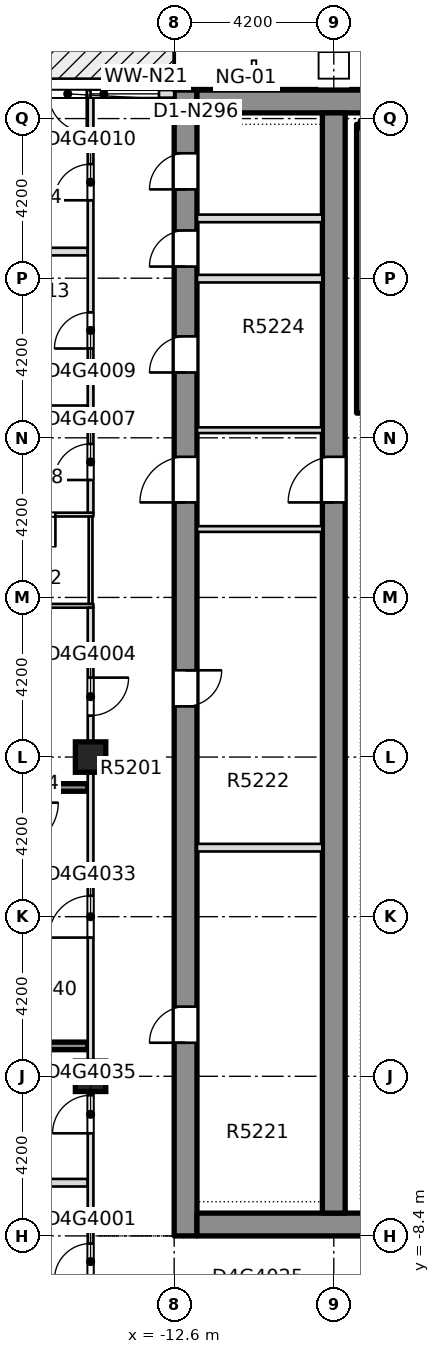
"""IFC4 building model, lengths in metres.
Left out: names, types, materials, properties, quantities, classifications, styles, units other than length and angle.
Written with IfcOpenShell. Run it as: python <this file> out.ifc"""

import sys

from ifc_helpers import new_model, si_unit, direction, frame, frame_2d, origin, origin_2d, place, context, subcontext, project, spatial, rectangle, extrude, element, fill, save


model = new_model("IFC4")
c1 = context("Model", 3, precision=1e-05, world=origin(), true_north=direction((0.0, 1.0)))
c2 = subcontext(c1, "Body", "Model", "MODEL_VIEW")
j1 = project(units=[si_unit("LENGTHUNIT", "METRE"), si_unit("PLANEANGLEUNIT", "RADIAN")], contexts=[c1])
p1 = place(None, origin())
s1 = spatial("IfcSite", under=j1, at=p1, CompositionType="ELEMENT")
p2 = place(p1, origin())
s2 = spatial("IfcBuilding", under=s1, at=p2, CompositionType="ELEMENT")
p3 = place(p2, frame((0.0, 0.0, 199.7)))
s3 = spatial("IfcBuildingStorey", under=s2, at=p3, CompositionType="ELEMENT", Elevation=199.7)
p4 = place(p3, frame((-12.3, -8.4, -0.4), z_axis=(0.0, 0.0, 1.0), x_axis=(0.0, 1.0, 0.0)))
e1 = element("IfcWall", 1, at=p4, inside=s3, PredefinedType="SHEAR", context=c2, shape_type="SweptSolid", body=[
    extrude(rectangle(XDim=30.15, YDim=0.6, at=frame_2d((15.075, 0.0))), origin(), (0.0, 0.0, 1.0), 3.45),
])
p5 = place(p4, frame((5.083, 0.0, 0.4)))
e2 = element("IfcOpeningElement", 2, at=p5, cuts=e1, PredefinedType="OPENING", context=c2, shape_type="SweptSolid", body=[
    extrude(rectangle(XDim=0.95, YDim=2.1, at=frame_2d((0.475, 1.05))), frame((0.0, 0.31, 0.0), z_axis=(0.0, -1.0, 0.0), x_axis=(1.0, 0.0, 0.0)), (0.0, 0.0, 1.0), 0.62),
])
p6 = place(p4, frame((13.933, 0.0, 0.4)))
e3 = element("IfcOpeningElement", 3, at=p6, cuts=e1, PredefinedType="OPENING", context=c2, shape_type="SweptSolid", body=[
    extrude(rectangle(XDim=0.95, YDim=2.1, at=frame_2d((0.475, 1.05))), frame((0.0, 0.31, 0.0), z_axis=(0.0, -1.0, 0.0), x_axis=(1.0, 0.0, 0.0)), (0.0, 0.0, 1.0), 0.62),
])
p7 = place(p4, frame((22.719, 0.0, 0.4)))
e4 = element("IfcOpeningElement", 4, at=p7, cuts=e1, PredefinedType="OPENING", context=c2, shape_type="SweptSolid", body=[
    extrude(rectangle(XDim=0.95, YDim=2.1, at=frame_2d((0.475, 1.05))), frame((0.0, 0.31, 0.0), z_axis=(0.0, -1.0, 0.0), x_axis=(1.0, 0.0, 0.0)), (0.0, 0.0, 1.0), 0.62),
])
p8 = place(p4, frame((25.506, 0.0, 0.4)))
e5 = element("IfcOpeningElement", 5, at=p8, cuts=e1, PredefinedType="OPENING", context=c2, shape_type="SweptSolid", body=[
    extrude(rectangle(XDim=0.95, YDim=2.1, at=frame_2d((0.475, 1.05))), frame((0.0, 0.31, 0.0), z_axis=(0.0, -1.0, 0.0), x_axis=(1.0, 0.0, 0.0)), (0.0, 0.0, 1.0), 0.62),
])
p9 = place(p4, frame((27.537, 0.0, 0.4)))
e6 = element("IfcOpeningElement", 6, at=p9, cuts=e1, PredefinedType="OPENING", context=c2, shape_type="SweptSolid", body=[
    extrude(rectangle(XDim=0.95, YDim=2.1, at=frame_2d((0.475, 1.05))), frame((0.0, 0.31, 0.0), z_axis=(0.0, -1.0, 0.0), x_axis=(1.0, 0.0, 0.0)), (0.0, 0.0, 1.0), 0.62),
])
p10 = place(p4, frame((19.3, 0.0, 0.4)))
e7 = element("IfcOpeningElement", 7, at=p10, cuts=e1, PredefinedType="OPENING", context=c2, shape_type="SweptSolid", body=[
    extrude(rectangle(XDim=1.2, YDim=2.1, at=frame_2d((0.6, 1.05))), frame((0.0, 0.31, 0.0), z_axis=(0.0, -1.0, 0.0), x_axis=(1.0, 0.0, 0.0)), (0.0, 0.0, 1.0), 0.62),
])
p11 = place(p3, frame((-12.0, -8.1, -0.4), z_axis=(0.0, 0.0, 1.0), x_axis=(1.0, 0.0, 0.0)))
e8 = element("IfcWall", 8, at=p11, inside=s3, PredefinedType="SHEAR", context=c2, shape_type="SweptSolid", body=[
    extrude(rectangle(XDim=24.0, YDim=0.6, at=frame_2d((12.0, 0.0))), origin(), (0.0, 0.0, 1.0), 3.45),
])
p12 = place(p11, frame((7.25, 0.0, 0.4)))
e9 = element("IfcOpeningElement", 9, at=p12, cuts=e8, PredefinedType="OPENING", context=c2, shape_type="SweptSolid", body=[
    extrude(rectangle(XDim=1.8, YDim=2.1, at=frame_2d((0.9, 1.05))), frame((0.0, 0.31, 0.0), z_axis=(0.0, -1.0, 0.0), x_axis=(1.0, 0.0, 0.0)), (0.0, 0.0, 1.0), 0.62),
])
p13 = place(p11, frame((14.95, 0.0, 0.4)))
e10 = element("IfcOpeningElement", 10, at=p13, cuts=e8, PredefinedType="OPENING", context=c2, shape_type="SweptSolid", body=[
    extrude(rectangle(XDim=1.8, YDim=2.1, at=frame_2d((0.9, 1.05))), frame((0.0, 0.31, 0.0), z_axis=(0.0, -1.0, 0.0), x_axis=(1.0, 0.0, 0.0)), (0.0, 0.0, 1.0), 0.62),
])
p14 = place(p3, frame((-12.0, 21.45, -0.4), z_axis=(0.0, 0.0, 1.0), x_axis=(1.0, 0.0, 0.0)))
e11 = element("IfcWall", 11, at=p14, inside=s3, PredefinedType="SHEAR", context=c2, shape_type="SweptSolid", body=[
    extrude(rectangle(XDim=24.0, YDim=0.6, at=frame_2d((12.0, 0.0))), origin(), (0.0, 0.0, 1.0), 3.45),
])
p15 = place(p3, frame((-8.4, -7.8, -0.4), z_axis=(0.0, 0.0, 1.0), x_axis=(0.0, 1.0, 0.0)))
e12 = element("IfcWall", 12, at=p15, inside=s3, PredefinedType="SHEAR", context=c2, shape_type="SweptSolid", body=[
    extrude(rectangle(XDim=28.95, YDim=0.6, at=frame_2d((14.475, 0.0))), origin(), (0.0, 0.0, 1.0), 3.45),
])
p16 = place(p15, frame((18.7, 0.0, 0.4)))
e13 = element("IfcOpeningElement", 13, at=p16, cuts=e12, PredefinedType="OPENING", context=c2, shape_type="SweptSolid", body=[
    extrude(rectangle(XDim=1.2, YDim=2.1, at=frame_2d((0.6, 1.05))), frame((0.0, 0.31, 0.0), z_axis=(0.0, -1.0, 0.0), x_axis=(1.0, 0.0, 0.0)), (0.0, 0.0, 1.0), 0.62),
])
for number, where, z_axis, x_axis in (
    (14, (-14.8, -4.2, -0.4), (0.0, 0.0, 1.0), (1.0, 0.0, 0.0)),
    (15, (-14.8, 4.2, -0.4), (0.0, 0.0, 1.0), (1.0, 0.0, 0.0)),
):
    element("IfcColumn", number, at=place(p3, frame(where, z_axis=z_axis, x_axis=x_axis)), inside=s3, PredefinedType="COLUMN", context=c2, shape_type="SweptSolid", body=[
        extrude(rectangle(XDim=0.8, YDim=0.8, at=origin_2d()), origin(), (0.0, 0.0, 1.0), 3.45),
    ])
p17 = place(p3, frame((-25.75, -7.0, 0.0), z_axis=(0.0, 0.0, 1.0), x_axis=(1.0, 0.0, 0.0)))
e16 = element("IfcWall", 16, at=p17, inside=s3, PredefinedType="PARTITIONING", context=c2, shape_type="SweptSolid", body=[
    extrude(rectangle(XDim=10.875, YDim=0.2, at=frame_2d((5.438, 0.0))), origin(), (0.0, 0.0, 1.0), 3.05),
])
p18 = place(p3, frame((-20.4, -3.4, 0.0), z_axis=(0.0, 0.0, 1.0), x_axis=(1.0, 0.0, 0.0)))
e17 = element("IfcWall", 17, at=p18, inside=s3, PredefinedType="SOLIDWALL", context=c2, shape_type="SweptSolid", body=[
    extrude(rectangle(XDim=5.525, YDim=0.2, at=frame_2d((2.762, 0.0))), origin(), (0.0, 0.0, 1.0), 3.05),
])
p19 = place(p3, frame((-20.45, 3.4, 0.0), z_axis=(0.0, 0.0, 1.0), x_axis=(1.0, 0.0, 0.0)))
e18 = element("IfcWall", 18, at=p19, inside=s3, PredefinedType="SOLIDWALL", context=c2, shape_type="SweptSolid", body=[
    extrude(rectangle(XDim=5.575, YDim=0.2, at=frame_2d((2.788, 0.0))), origin(), (0.0, 0.0, 1.0), 3.05),
])
p20 = place(p3, frame((-17.55, 8.18, 0.0), z_axis=(0.0, 0.0, 1.0), x_axis=(1.0, 0.0, 0.0)))
e19 = element("IfcWall", 19, at=p20, inside=s3, PredefinedType="PARTITIONING", context=c2, shape_type="SweptSolid", body=[
    extrude(rectangle(XDim=2.825, YDim=0.1, at=frame_2d((1.413, 0.0))), origin(), (0.0, 0.0, 1.0), 3.05),
])
p21 = place(p3, frame((-17.55, 10.58, 0.0), z_axis=(0.0, 0.0, 1.0), x_axis=(1.0, 0.0, 0.0)))
e20 = element("IfcWall", 20, at=p21, inside=s3, PredefinedType="PARTITIONING", context=c2, shape_type="SweptSolid", body=[
    extrude(rectangle(XDim=2.825, YDim=0.1, at=frame_2d((1.413, 0.0))), origin(), (0.0, 0.0, 1.0), 3.05),
])
p22 = place(p21, frame((0.975, 0.0, 0.0)))
e21 = element("IfcOpeningElement", 21, at=p22, cuts=e20, PredefinedType="OPENING", context=c2, shape_type="SweptSolid", body=[
    extrude(rectangle(XDim=0.85, YDim=2.1, at=frame_2d((0.425, 1.05))), frame((0.0, 0.06, 0.0), z_axis=(0.0, -1.0, 0.0), x_axis=(1.0, 0.0, 0.0)), (0.0, 0.0, 1.0), 0.12),
])
for number, where, z_axis, x_axis in (
    (22, (-17.35, 13.35, 0.0), (0.0, 0.0, 1.0), (1.0, 0.0, 0.0)),
    (23, (-17.35, 17.5, 0.0), (0.0, 0.0, 1.0), (1.0, 0.0, 0.0)),
):
    element("IfcWall", number, at=place(p3, frame(where, z_axis=z_axis, x_axis=x_axis)), inside=s3, PredefinedType="PARTITIONING", context=c2, shape_type="SweptSolid", body=[
        extrude(rectangle(XDim=2.475, YDim=0.2, at=frame_2d((1.238, 0.0))), origin(), (0.0, 0.0, 1.0), 3.05),
    ])
p23 = place(p3, frame((-14.8, -10.45, 0.0), z_axis=(0.0, 0.0, 1.0), x_axis=(0.0, 1.0, 0.0)))
e24 = element("IfcWall", 24, at=p23, inside=s3, PredefinedType="PARTITIONING", context=c2, shape_type="SweptSolid", body=[
    extrude(rectangle(XDim=18.58, YDim=0.15, at=frame_2d((9.29, 0.0))), origin(), (0.0, 0.0, 1.0), 3.05),
])
p24 = place(p23, frame((0.9, 0.0, 0.0)))
e25 = element("IfcOpeningElement", 25, at=p24, cuts=e24, PredefinedType="OPENING", context=c2, shape_type="SweptSolid", body=[
    extrude(rectangle(XDim=0.95, YDim=2.1, at=frame_2d((0.475, 1.05))), frame((0.0, 0.085, 0.0), z_axis=(0.0, -1.0, 0.0), x_axis=(1.0, 0.0, 0.0)), (0.0, 0.0, 1.0), 0.17),
])
p25 = place(p23, frame((15.74, 0.0, 0.0)))
e26 = element("IfcOpeningElement", 26, at=p25, cuts=e24, PredefinedType="OPENING", context=c2, shape_type="SweptSolid", body=[
    extrude(rectangle(XDim=1.0, YDim=2.1, at=frame_2d((0.5, 1.05))), frame((0.0, 0.085, 0.0), z_axis=(0.0, -1.0, 0.0), x_axis=(1.0, 0.0, 0.0)), (0.0, 0.0, 1.0), 0.17),
])
p26 = place(p23, frame((9.9, 0.0, 0.0)))
e27 = element("IfcOpeningElement", 27, at=p26, cuts=e24, PredefinedType="OPENING", context=c2, shape_type="SweptSolid", body=[
    extrude(rectangle(XDim=1.1, YDim=2.1, at=frame_2d((0.55, 1.05))), frame((0.0, 0.085, 0.0), z_axis=(0.0, -1.0, 0.0), x_axis=(1.0, 0.0, 0.0)), (0.0, 0.0, 1.0), 0.17),
])
p27 = place(p23, frame((4.75, 0.0, 0.0)))
e28 = element("IfcOpeningElement", 28, at=p27, cuts=e24, PredefinedType="OPENING", context=c2, shape_type="SweptSolid", body=[
    extrude(rectangle(XDim=1.0, YDim=2.1, at=frame_2d((0.5, 1.05))), frame((0.0, 0.085, 0.0), z_axis=(0.0, -1.0, 0.0), x_axis=(1.0, 0.0, 0.0)), (0.0, 0.0, 1.0), 0.17),
])
p28 = place(p3, frame((-14.8, 8.23, 0.0), z_axis=(0.0, 0.0, 1.0), x_axis=(0.0, 1.0, 0.0)))
e29 = element("IfcWall", 29, at=p28, inside=s3, PredefinedType="PARTITIONING", context=c2, shape_type="SweptSolid", body=[
    extrude(rectangle(XDim=2.3, YDim=0.1, at=frame_2d((1.15, 0.0))), origin(), (0.0, 0.0, 1.0), 3.05),
])
p29 = place(p3, frame((-14.8, 10.63, 0.0), z_axis=(0.0, 0.0, 1.0), x_axis=(0.0, 1.0, 0.0)))
e30 = element("IfcWall", 30, at=p29, inside=s3, PredefinedType="PARTITIONING", context=c2, shape_type="SweptSolid", body=[
    extrude(rectangle(XDim=10.92, YDim=0.15, at=frame_2d((5.46, 0.0))), origin(), (0.0, 0.0, 1.0), 3.05),
])
p30 = place(p29, frame((0.86, 0.0, 0.0)))
e31 = element("IfcOpeningElement", 31, at=p30, cuts=e30, PredefinedType="OPENING", context=c2, shape_type="SweptSolid", body=[
    extrude(rectangle(XDim=0.95, YDim=2.1, at=frame_2d((0.475, 1.05))), frame((0.0, 0.085, 0.0), z_axis=(0.0, -1.0, 0.0), x_axis=(1.0, 0.0, 0.0)), (0.0, 0.0, 1.0), 0.17),
])
p31 = place(p29, frame((4.32, 0.0, 0.0)))
e32 = element("IfcOpeningElement", 32, at=p31, cuts=e30, PredefinedType="OPENING", context=c2, shape_type="SweptSolid", body=[
    extrude(rectangle(XDim=0.95, YDim=2.1, at=frame_2d((0.475, 1.05))), frame((0.0, 0.085, 0.0), z_axis=(0.0, -1.0, 0.0), x_axis=(1.0, 0.0, 0.0)), (0.0, 0.0, 1.0), 0.17),
])
p32 = place(p29, frame((8.22, 0.0, 0.0)))
e33 = element("IfcOpeningElement", 33, at=p32, cuts=e30, PredefinedType="OPENING", context=c2, shape_type="SweptSolid", body=[
    extrude(rectangle(XDim=0.95, YDim=2.1, at=frame_2d((0.475, 1.05))), frame((0.0, 0.085, 0.0), z_axis=(0.0, -1.0, 0.0), x_axis=(1.0, 0.0, 0.0)), (0.0, 0.0, 1.0), 0.17),
])
p33 = place(p3, frame((-12.6, 21.65, 0.0), z_axis=(0.0, 0.0, 1.0), x_axis=(-1.0, 0.0, 0.0)))
e34 = element("IfcWall", 34, at=p33, inside=s3, PredefinedType="STANDARD", context=c2, shape_type="SweptSolid", body=[
    extrude(rectangle(XDim=3.7, YDim=0.2, at=frame_2d((1.85, 0.0))), origin(), (0.0, 0.0, 1.0), 3.05),
])
p34 = place(p33, frame((0.4, 0.0, 0.2)))
e35 = element("IfcOpeningElement", 35, at=p34, cuts=e34, PredefinedType="OPENING", context=c2, shape_type="SweptSolid", body=[
    extrude(rectangle(XDim=1.8, YDim=2.65, at=frame_2d((0.9, 1.325))), frame((0.0, 0.11, 0.0), z_axis=(0.0, -1.0, 0.0), x_axis=(1.0, 0.0, 0.0)), (0.0, 0.0, 1.0), 0.22),
])
p35 = place(p33, frame((2.3, 0.0, 0.0)))
e36 = element("IfcOpeningElement", 36, at=p35, cuts=e34, PredefinedType="OPENING", context=c2, shape_type="SweptSolid", body=[
    extrude(rectangle(XDim=1.0, YDim=2.4, at=frame_2d((0.5, 1.2))), frame((0.0, 0.11, 0.0), z_axis=(0.0, -1.0, 0.0), x_axis=(1.0, 0.0, 0.0)), (0.0, 0.0, 1.0), 0.22),
])
p36 = place(p3, frame((-11.999, 1.816, 0.0), z_axis=(0.0, 0.0, 1.0), x_axis=(1.0, 0.0, 0.0)))
e37 = element("IfcWall", 37, at=p36, inside=s3, PredefinedType="PARTITIONING", context=c2, shape_type="SweptSolid", body=[
    extrude(rectangle(XDim=3.298, YDim=0.2, at=frame_2d((1.649, 0.0))), origin(), (0.0, 0.0, 1.0), 3.05),
])
for number, where, z_axis, x_axis in (
    (38, (-11.999, 10.2, 0.0), (0.0, 0.0, 1.0), (1.0, 0.0, 0.0)),
    (39, (-11.999, 12.8, 0.0), (0.0, 0.0, 1.0), (1.0, 0.0, 0.0)),
):
    element("IfcWall", number, at=place(p3, frame(where, z_axis=z_axis, x_axis=x_axis)), inside=s3, PredefinedType="PARTITIONING", context=c2, shape_type="SweptSolid", body=[
        extrude(rectangle(XDim=3.298, YDim=0.15, at=frame_2d((1.649, 0.0))), origin(), (0.0, 0.0, 1.0), 3.05),
    ])
for number, where, z_axis, x_axis in (
    (40, (-11.999, 16.788, 0.0), (0.0, 0.0, 1.0), (1.0, 0.0, 0.0)),
    (41, (-11.999, 18.373, 0.0), (0.0, 0.0, 1.0), (1.0, 0.0, 0.0)),
):
    element("IfcWall", number, at=place(p3, frame(where, z_axis=z_axis, x_axis=x_axis)), inside=s3, PredefinedType="PARTITIONING", context=c2, shape_type="SweptSolid", body=[
        extrude(rectangle(XDim=3.298, YDim=0.2, at=frame_2d((1.649, 0.0))), origin(), (0.0, 0.0, 1.0), 3.05),
    ])
p37 = place(p3, frame((-7.7, 13.25, 0.0), z_axis=(0.0, 0.0, 1.0), x_axis=(0.0, 1.0, 0.0)))
e42 = element("IfcWall", 42, at=p37, inside=s3, PredefinedType="SOLIDWALL", context=c2, shape_type="SweptSolid", body=[
    extrude(rectangle(XDim=7.6, YDim=0.2, at=frame_2d((3.8, 0.0))), origin(), (0.0, 0.0, 1.0), 3.05),
])
p38 = place(p3, frame((-7.7, 20.85, 0.0), z_axis=(0.0, 0.0, 1.0), x_axis=(1.0, 0.0, 0.0)))
e43 = element("IfcWall", 43, at=p38, inside=s3, PredefinedType="SOLIDWALL", context=c2, shape_type="SweptSolid", body=[
    extrude(rectangle(XDim=3.55, YDim=0.2, at=frame_2d((1.775, 0.0))), origin(), (0.0, 0.0, 1.0), 3.05),
])
p39 = place(p24, origin())
e44 = element("IfcDoor", 44, at=p39, inside=s3, OperationType="SINGLE_SWING_LEFT", PredefinedType="DOOR", context=c2, shape_type="SweptSolid", body=[
    extrude(rectangle(XDim=0.95, YDim=2.1, at=frame_2d((0.475, 1.05))), frame((0.0, 0.025, 0.0), z_axis=(0.0, -1.0, 0.0), x_axis=(1.0, 0.0, 0.0)), (0.0, 0.0, 1.0), 0.05),
])
fill(e25, e44)
p40 = place(p25, origin())
e45 = element("IfcDoor", 45, at=p40, inside=s3, OperationType="SINGLE_SWING_RIGHT", PredefinedType="DOOR", context=c2, shape_type="SweptSolid", body=[
    extrude(rectangle(XDim=1.0, YDim=2.1, at=frame_2d((0.5, 1.05))), frame((0.0, 0.025, 0.0), z_axis=(0.0, -1.0, 0.0), x_axis=(1.0, 0.0, 0.0)), (0.0, 0.0, 1.0), 0.05),
])
fill(e26, e45)
p41 = place(p30, origin())
e46 = element("IfcDoor", 46, at=p41, inside=s3, OperationType="SINGLE_SWING_LEFT", PredefinedType="DOOR", context=c2, shape_type="SweptSolid", body=[
    extrude(rectangle(XDim=0.95, YDim=2.1, at=frame_2d((0.475, 1.05))), frame((0.0, 0.025, 0.0), z_axis=(0.0, -1.0, 0.0), x_axis=(1.0, 0.0, 0.0)), (0.0, 0.0, 1.0), 0.05),
])
fill(e31, e46)
p42 = place(p22, origin())
e47 = element("IfcDoor", 47, at=p42, inside=s3, OperationType="SINGLE_SWING_RIGHT", PredefinedType="DOOR", context=c2, shape_type="SweptSolid", body=[
    extrude(rectangle(XDim=0.85, YDim=2.1, at=frame_2d((0.425, 1.05))), frame((0.0, 0.025, 0.0), z_axis=(0.0, -1.0, 0.0), x_axis=(1.0, 0.0, 0.0)), (0.0, 0.0, 1.0), 0.05),
])
fill(e21, e47)
p43 = place(p31, origin())
e48 = element("IfcDoor", 48, at=p43, inside=s3, OperationType="SINGLE_SWING_LEFT", PredefinedType="DOOR", context=c2, shape_type="SweptSolid", body=[
    extrude(rectangle(XDim=0.95, YDim=2.1, at=frame_2d((0.475, 1.05))), frame((0.0, 0.025, 0.0), z_axis=(0.0, -1.0, 0.0), x_axis=(1.0, 0.0, 0.0)), (0.0, 0.0, 1.0), 0.05),
])
fill(e32, e48)
p44 = place(p32, origin())
e49 = element("IfcDoor", 49, at=p44, inside=s3, OperationType="SINGLE_SWING_RIGHT", PredefinedType="DOOR", context=c2, shape_type="SweptSolid", body=[
    extrude(rectangle(XDim=0.95, YDim=2.1, at=frame_2d((0.475, 1.05))), frame((0.0, 0.025, 0.0), z_axis=(0.0, -1.0, 0.0), x_axis=(1.0, 0.0, 0.0)), (0.0, 0.0, 1.0), 0.05),
])
fill(e33, e49)
p45 = place(p26, origin())
e50 = element("IfcDoor", 50, at=p45, inside=s3, OperationType="SINGLE_SWING_RIGHT", PredefinedType="DOOR", context=c2, shape_type="SweptSolid", body=[
    extrude(rectangle(XDim=1.1, YDim=2.1, at=frame_2d((0.55, 1.05))), frame((0.0, 0.025, 0.0), z_axis=(0.0, -1.0, 0.0), x_axis=(1.0, 0.0, 0.0)), (0.0, 0.0, 1.0), 0.05),
])
fill(e27, e50)
p46 = place(p27, origin())
e51 = element("IfcDoor", 51, at=p46, inside=s3, OperationType="SINGLE_SWING_LEFT", PredefinedType="DOOR", context=c2, shape_type="SweptSolid", body=[
    extrude(rectangle(XDim=1.0, YDim=2.1, at=frame_2d((0.5, 1.05))), frame((0.0, 0.025, 0.0), z_axis=(0.0, -1.0, 0.0), x_axis=(1.0, 0.0, 0.0)), (0.0, 0.0, 1.0), 0.05),
])
fill(e28, e51)
p47 = place(p34, origin())
e52 = element("IfcWindow", 52, at=p47, inside=s3, PartitioningType="SINGLE_PANEL", PredefinedType="WINDOW", context=c2, shape_type="SweptSolid", body=[
    extrude(rectangle(XDim=1.8, YDim=2.65, at=frame_2d((0.9, 1.325))), frame((0.0, 0.03, 0.0), z_axis=(0.0, -1.0, 0.0), x_axis=(1.0, 0.0, 0.0)), (0.0, 0.0, 1.0), 0.06),
])
fill(e35, e52)
p48 = place(p35, origin())
e53 = element("IfcDoor", 53, at=p48, inside=s3, OperationType="SINGLE_SWING_LEFT", PredefinedType="DOOR", context=c2, shape_type="SweptSolid", body=[
    extrude(rectangle(XDim=1.0, YDim=2.4, at=frame_2d((0.5, 1.2))), frame((0.0, 0.025, 0.0), z_axis=(0.0, -1.0, 0.0), x_axis=(1.0, 0.0, 0.0)), (0.0, 0.0, 1.0), 0.05),
])
fill(e36, e53)
p49 = place(p5, origin())
e54 = element("IfcDoor", 54, at=p49, inside=s3, OperationType="SINGLE_SWING_LEFT", PredefinedType="DOOR", context=c2, shape_type="SweptSolid", body=[
    extrude(rectangle(XDim=0.95, YDim=2.1, at=frame_2d((0.475, 1.05))), frame((0.0, 0.025, 0.0), z_axis=(0.0, -1.0, 0.0), x_axis=(1.0, 0.0, 0.0)), (0.0, 0.0, 1.0), 0.05),
])
fill(e2, e54)
p50 = place(p6, origin())
e55 = element("IfcDoor", 55, at=p50, inside=s3, OperationType="SINGLE_SWING_LEFT", PredefinedType="DOOR", context=c2, shape_type="SweptSolid", body=[
    extrude(rectangle(XDim=0.95, YDim=2.1, at=frame_2d((0.475, 1.05))), frame((0.0, 0.025, 0.0), z_axis=(0.0, -1.0, 0.0), x_axis=(1.0, 0.0, 0.0)), (0.0, 0.0, 1.0), 0.05),
])
fill(e3, e55)
p51 = place(p7, origin())
e56 = element("IfcDoor", 56, at=p51, inside=s3, OperationType="SINGLE_SWING_LEFT", PredefinedType="DOOR", context=c2, shape_type="SweptSolid", body=[
    extrude(rectangle(XDim=0.95, YDim=2.1, at=frame_2d((0.475, 1.05))), frame((0.0, 0.025, 0.0), z_axis=(0.0, -1.0, 0.0), x_axis=(1.0, 0.0, 0.0)), (0.0, 0.0, 1.0), 0.05),
])
fill(e4, e56)
p52 = place(p8, origin())
e57 = element("IfcDoor", 57, at=p52, inside=s3, OperationType="SINGLE_SWING_LEFT", PredefinedType="DOOR", context=c2, shape_type="SweptSolid", body=[
    extrude(rectangle(XDim=0.95, YDim=2.1, at=frame_2d((0.475, 1.05))), frame((0.0, 0.025, 0.0), z_axis=(0.0, -1.0, 0.0), x_axis=(1.0, 0.0, 0.0)), (0.0, 0.0, 1.0), 0.05),
])
fill(e5, e57)
p53 = place(p9, origin())
e58 = element("IfcDoor", 58, at=p53, inside=s3, OperationType="SINGLE_SWING_LEFT", PredefinedType="DOOR", context=c2, shape_type="SweptSolid", body=[
    extrude(rectangle(XDim=0.95, YDim=2.1, at=frame_2d((0.475, 1.05))), frame((0.0, 0.025, 0.0), z_axis=(0.0, -1.0, 0.0), x_axis=(1.0, 0.0, 0.0)), (0.0, 0.0, 1.0), 0.05),
])
fill(e6, e58)
p54 = place(p10, origin())
e59 = element("IfcDoor", 59, at=p54, inside=s3, OperationType="SINGLE_SWING_LEFT", PredefinedType="DOOR", context=c2, shape_type="SweptSolid", body=[
    extrude(rectangle(XDim=1.2, YDim=2.1, at=frame_2d((0.6, 1.05))), frame((0.0, 0.025, 0.0), z_axis=(0.0, -1.0, 0.0), x_axis=(1.0, 0.0, 0.0)), (0.0, 0.0, 1.0), 0.05),
])
fill(e7, e59)
p55 = place(p16, origin())
e60 = element("IfcDoor", 60, at=p55, inside=s3, OperationType="SINGLE_SWING_LEFT", PredefinedType="DOOR", context=c2, shape_type="SweptSolid", body=[
    extrude(rectangle(XDim=1.2, YDim=2.1, at=frame_2d((0.6, 1.05))), frame((0.0, 0.025, 0.0), z_axis=(0.0, -1.0, 0.0), x_axis=(1.0, 0.0, 0.0)), (0.0, 0.0, 1.0), 0.05),
])
fill(e13, e60)
save(model, sys.argv[1])
